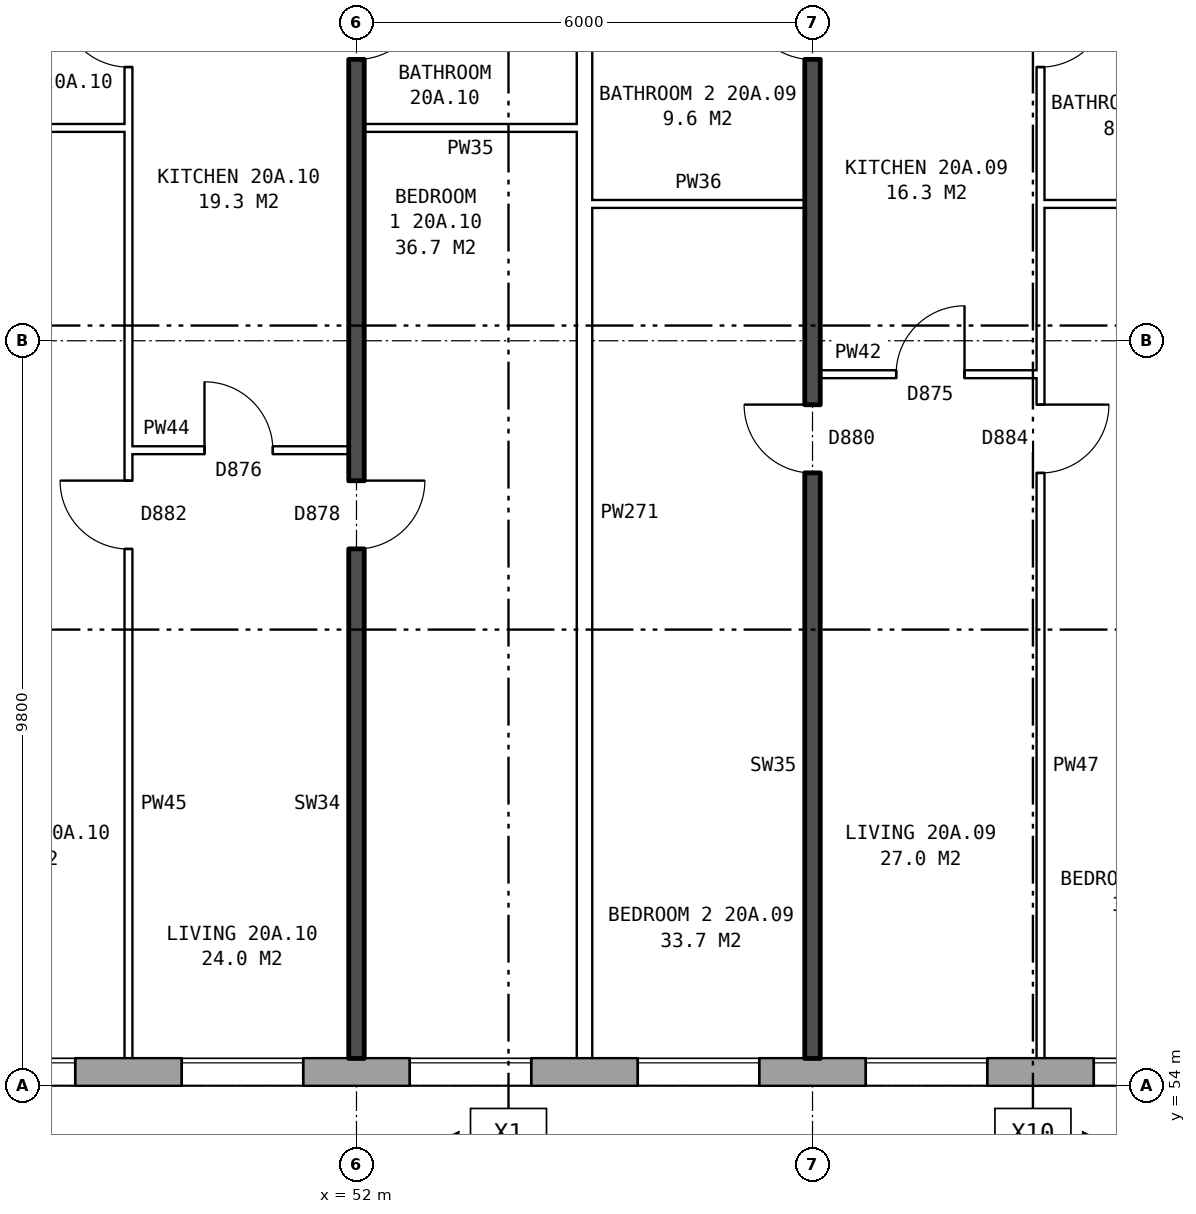
"""IFC4 building model, lengths in metres.
Left out: names, types, materials, properties, quantities, classifications, styles, units other than length and angle.
Written with IfcOpenShell. Run it as: python <this file> out.ifc"""

import sys

from ifc_helpers import new_model, si_unit, direction, frame, frame_2d, origin, place, context, subcontext, project, spatial, rectangle, extrude, element, fill, save


model = new_model("IFC4")
c1 = context("Model", 3, precision=1e-05, world=origin(), true_north=direction((0.0, 1.0)))
c2 = subcontext(c1, "Body", "Model", "MODEL_VIEW")
j1 = project(units=[si_unit("LENGTHUNIT", "METRE"), si_unit("PLANEANGLEUNIT", "RADIAN")], contexts=[c1])
p1 = place(None, origin())
s1 = spatial("IfcSite", under=j1, at=p1, CompositionType="ELEMENT")
p2 = place(p1, origin())
s2 = spatial("IfcBuilding", under=s1, at=p2, CompositionType="ELEMENT")
p3 = place(p2, frame((0.0, 0.0, 74.7)))
s3 = spatial("IfcBuildingStorey", under=s2, at=p3, CompositionType="ELEMENT", Elevation=74.7)
p4 = place(p3, frame((26.325, 54.18, 0.0), z_axis=(0.0, 0.0, 1.0), x_axis=(1.0, 0.0, 0.0)))
e1 = element("IfcWall", 1, at=p4, inside=s3, PredefinedType="STANDARD", context=c2, shape_type="SweptSolid", body=[
    extrude(rectangle(XDim=46.601, YDim=0.36, at=frame_2d((23.3, 0.0))), origin(), (0.0, 0.0, 1.0), 2.85),
])
p5 = place(p4, frame((2.375, 0.0, 0.8)))
e2 = element("IfcOpeningElement", 2, at=p5, cuts=e1, PredefinedType="OPENING", context=c2, shape_type="SweptSolid", body=[
    extrude(rectangle(XDim=1.6, YDim=1.8, at=frame_2d((0.8, 0.9))), frame((0.0, 0.19, 0.0), z_axis=(0.0, -1.0, 0.0), x_axis=(1.0, 0.0, 0.0)), (0.0, 0.0, 1.0), 0.38),
])
p6 = place(p4, frame((4.275, 0.0, 0.8)))
e3 = element("IfcOpeningElement", 3, at=p6, cuts=e1, PredefinedType="OPENING", context=c2, shape_type="SweptSolid", body=[
    extrude(rectangle(XDim=1.6, YDim=1.8, at=frame_2d((0.8, 0.9))), frame((0.0, 0.19, 0.0), z_axis=(0.0, -1.0, 0.0), x_axis=(1.0, 0.0, 0.0)), (0.0, 0.0, 1.0), 0.38),
])
p7 = place(p4, frame((8.275, 0.0, 0.8)))
e4 = element("IfcOpeningElement", 4, at=p7, cuts=e1, PredefinedType="OPENING", context=c2, shape_type="SweptSolid", body=[
    extrude(rectangle(XDim=0.8, YDim=0.9, at=frame_2d((0.4, 0.45))), frame((0.0, 0.19, 0.0), z_axis=(0.0, -1.0, 0.0), x_axis=(1.0, 0.0, 0.0)), (0.0, 0.0, 1.0), 0.38),
])
p8 = place(p4, frame((11.375, 0.0, 0.8)))
e5 = element("IfcOpeningElement", 5, at=p8, cuts=e1, PredefinedType="OPENING", context=c2, shape_type="SweptSolid", body=[
    extrude(rectangle(XDim=1.6, YDim=1.8, at=frame_2d((0.8, 0.9))), frame((0.0, 0.19, 0.0), z_axis=(0.0, -1.0, 0.0), x_axis=(1.0, 0.0, 0.0)), (0.0, 0.0, 1.0), 0.38),
])
p9 = place(p4, frame((14.375, 0.0, 0.8)))
e6 = element("IfcOpeningElement", 6, at=p9, cuts=e1, PredefinedType="OPENING", context=c2, shape_type="SweptSolid", body=[
    extrude(rectangle(XDim=1.6, YDim=1.8, at=frame_2d((0.8, 0.9))), frame((0.0, 0.19, 0.0), z_axis=(0.0, -1.0, 0.0), x_axis=(1.0, 0.0, 0.0)), (0.0, 0.0, 1.0), 0.38),
])
p10 = place(p4, frame((17.375, 0.0, 0.8)))
e7 = element("IfcOpeningElement", 7, at=p10, cuts=e1, PredefinedType="OPENING", context=c2, shape_type="SweptSolid", body=[
    extrude(rectangle(XDim=1.6, YDim=1.8, at=frame_2d((0.8, 0.9))), frame((0.0, 0.19, 0.0), z_axis=(0.0, -1.0, 0.0), x_axis=(1.0, 0.0, 0.0)), (0.0, 0.0, 1.0), 0.38),
])
p11 = place(p4, frame((20.375, 0.0, 0.8)))
e8 = element("IfcOpeningElement", 8, at=p11, cuts=e1, PredefinedType="OPENING", context=c2, shape_type="SweptSolid", body=[
    extrude(rectangle(XDim=1.6, YDim=1.8, at=frame_2d((0.8, 0.9))), frame((0.0, 0.19, 0.0), z_axis=(0.0, -1.0, 0.0), x_axis=(1.0, 0.0, 0.0)), (0.0, 0.0, 1.0), 0.38),
])
p12 = place(p4, frame((23.375, 0.0, 0.8)))
e9 = element("IfcOpeningElement", 9, at=p12, cuts=e1, PredefinedType="OPENING", context=c2, shape_type="SweptSolid", body=[
    extrude(rectangle(XDim=1.6, YDim=1.8, at=frame_2d((0.8, 0.9))), frame((0.0, 0.19, 0.0), z_axis=(0.0, -1.0, 0.0), x_axis=(1.0, 0.0, 0.0)), (0.0, 0.0, 1.0), 0.38),
])
p13 = place(p4, frame((26.375, 0.0, 0.8)))
e10 = element("IfcOpeningElement", 10, at=p13, cuts=e1, PredefinedType="OPENING", context=c2, shape_type="SweptSolid", body=[
    extrude(rectangle(XDim=1.6, YDim=1.8, at=frame_2d((0.8, 0.9))), frame((0.0, 0.19, 0.0), z_axis=(0.0, -1.0, 0.0), x_axis=(1.0, 0.0, 0.0)), (0.0, 0.0, 1.0), 0.38),
])
p14 = place(p4, frame((29.375, 0.0, 0.8)))
e11 = element("IfcOpeningElement", 11, at=p14, cuts=e1, PredefinedType="OPENING", context=c2, shape_type="SweptSolid", body=[
    extrude(rectangle(XDim=1.6, YDim=1.8, at=frame_2d((0.8, 0.9))), frame((0.0, 0.19, 0.0), z_axis=(0.0, -1.0, 0.0), x_axis=(1.0, 0.0, 0.0)), (0.0, 0.0, 1.0), 0.38),
])
p15 = place(p4, frame((32.375, 0.0, 0.8)))
e12 = element("IfcOpeningElement", 12, at=p15, cuts=e1, PredefinedType="OPENING", context=c2, shape_type="SweptSolid", body=[
    extrude(rectangle(XDim=1.6, YDim=1.8, at=frame_2d((0.8, 0.9))), frame((0.0, 0.19, 0.0), z_axis=(0.0, -1.0, 0.0), x_axis=(1.0, 0.0, 0.0)), (0.0, 0.0, 1.0), 0.38),
])
p16 = place(p4, frame((35.375, 0.0, 0.8)))
e13 = element("IfcOpeningElement", 13, at=p16, cuts=e1, PredefinedType="OPENING", context=c2, shape_type="SweptSolid", body=[
    extrude(rectangle(XDim=1.6, YDim=1.8, at=frame_2d((0.8, 0.9))), frame((0.0, 0.19, 0.0), z_axis=(0.0, -1.0, 0.0), x_axis=(1.0, 0.0, 0.0)), (0.0, 0.0, 1.0), 0.38),
])
p17 = place(p4, frame((39.625, 0.0, 1.7)))
e14 = element("IfcOpeningElement", 14, at=p17, cuts=e1, PredefinedType="OPENING", context=c2, shape_type="SweptSolid", body=[
    extrude(rectangle(XDim=1.4, YDim=0.9, at=frame_2d((0.7, 0.45))), frame((0.0, 0.19, 0.0), z_axis=(0.0, -1.0, 0.0), x_axis=(1.0, 0.0, 0.0)), (0.0, 0.0, 1.0), 0.38),
])
p18 = place(p4, frame((41.375, 0.0, 0.8)))
e15 = element("IfcOpeningElement", 15, at=p18, cuts=e1, PredefinedType="OPENING", context=c2, shape_type="SweptSolid", body=[
    extrude(rectangle(XDim=1.6, YDim=1.8, at=frame_2d((0.8, 0.9))), frame((0.0, 0.19, 0.0), z_axis=(0.0, -1.0, 0.0), x_axis=(1.0, 0.0, 0.0)), (0.0, 0.0, 1.0), 0.38),
])
p19 = place(p4, frame((44.375, 0.0, 0.8)))
e16 = element("IfcOpeningElement", 16, at=p19, cuts=e1, PredefinedType="OPENING", context=c2, shape_type="SweptSolid", body=[
    extrude(rectangle(XDim=1.6, YDim=1.8, at=frame_2d((0.8, 0.9))), frame((0.0, 0.19, 0.0), z_axis=(0.0, -1.0, 0.0), x_axis=(1.0, 0.0, 0.0)), (0.0, 0.0, 1.0), 0.38),
])
p20 = place(p4, frame((6.175, 0.0, 1.7)))
e17 = element("IfcOpeningElement", 17, at=p20, cuts=e1, PredefinedType="OPENING", context=c2, shape_type="SweptSolid", body=[
    extrude(rectangle(XDim=0.8, YDim=0.9, at=frame_2d((0.4, 0.45))), frame((0.0, 0.19, 0.0), z_axis=(0.0, -1.0, 0.0), x_axis=(1.0, 0.0, 0.0)), (0.0, 0.0, 1.0), 0.38),
])
p21 = place(p4, frame((9.375, 0.0, 0.8)))
e18 = element("IfcOpeningElement", 18, at=p21, cuts=e1, PredefinedType="OPENING", context=c2, shape_type="SweptSolid", body=[
    extrude(rectangle(XDim=1.0, YDim=1.8, at=frame_2d((0.5, 0.9))), frame((0.0, 0.19, 0.0), z_axis=(0.0, -1.0, 0.0), x_axis=(1.0, 0.0, 0.0)), (0.0, 0.0, 1.0), 0.38),
])
p22 = place(p3, frame((49.0, 62.36, 0.0), z_axis=(0.0, 0.0, 1.0), x_axis=(1.0, 0.0, 0.0)))
e19 = element("IfcWall", 19, at=p22, inside=s3, PredefinedType="PARTITIONING", context=c2, shape_type="SweptSolid", body=[
    extrude(rectangle(XDim=2.9, YDim=0.1, at=frame_2d((1.45, 0.0))), origin(), (0.0, 0.0, 1.0), 2.85),
])
p23 = place(p22, frame((1.0, 0.0, 0.0)))
e20 = element("IfcOpeningElement", 20, at=p23, cuts=e19, PredefinedType="OPENING", context=c2, shape_type="SweptSolid", body=[
    extrude(rectangle(XDim=0.9, YDim=2.1, at=frame_2d((0.45, 1.05))), frame((0.0, 0.06, 0.0), z_axis=(0.0, -1.0, 0.0), x_axis=(1.0, 0.0, 0.0)), (0.0, 0.0, 1.0), 0.12),
])
p24 = place(p3, frame((58.1, 63.36, 0.0), z_axis=(0.0, 0.0, 1.0), x_axis=(1.0, 0.0, 0.0)))
e21 = element("IfcWall", 21, at=p24, inside=s3, PredefinedType="PARTITIONING", context=c2, shape_type="SweptSolid", body=[
    extrude(rectangle(XDim=2.9, YDim=0.1, at=frame_2d((1.45, 0.0))), origin(), (0.0, 0.0, 1.0), 2.85),
])
p25 = place(p24, frame((1.0, 0.0, 0.0)))
e22 = element("IfcOpeningElement", 22, at=p25, cuts=e21, PredefinedType="OPENING", context=c2, shape_type="SweptSolid", body=[
    extrude(rectangle(XDim=0.9, YDim=2.1, at=frame_2d((0.45, 1.05))), frame((0.0, 0.06, 0.0), z_axis=(0.0, -1.0, 0.0), x_axis=(1.0, 0.0, 0.0)), (0.0, 0.0, 1.0), 0.12),
])
p26 = place(p3, frame((55.1, 65.6, 0.0), z_axis=(0.0, 0.0, 1.0), x_axis=(1.0, 0.0, 0.0)))
e23 = element("IfcWall", 23, at=p26, inside=s3, PredefinedType="PARTITIONING", context=c2, shape_type="SweptSolid", body=[
    extrude(rectangle(XDim=2.8, YDim=0.1, at=frame_2d((1.4, 0.0))), origin(), (0.0, 0.0, 1.0), 2.85),
])
p27 = place(p3, frame((61.0, 65.6, 0.0), z_axis=(0.0, 0.0, 1.0), x_axis=(1.0, 0.0, 0.0)))
e24 = element("IfcWall", 24, at=p27, inside=s3, PredefinedType="PARTITIONING", context=c2, shape_type="SweptSolid", body=[
    extrude(rectangle(XDim=2.64, YDim=0.1, at=frame_2d((1.32, 0.0))), origin(), (0.0, 0.0, 1.0), 2.85),
])
p28 = place(p3, frame((46.1, 66.6, 0.0), z_axis=(0.0, 0.0, 1.0), x_axis=(1.0, 0.0, 0.0)))
e25 = element("IfcWall", 25, at=p28, inside=s3, PredefinedType="PARTITIONING", context=c2, shape_type="SweptSolid", body=[
    extrude(rectangle(XDim=2.9, YDim=0.1, at=frame_2d((1.45, 0.0))), origin(), (0.0, 0.0, 1.0), 2.85),
])
p29 = place(p3, frame((52.1, 66.6, 0.0), z_axis=(0.0, 0.0, 1.0), x_axis=(1.0, 0.0, 0.0)))
e26 = element("IfcWall", 26, at=p29, inside=s3, PredefinedType="PARTITIONING", context=c2, shape_type="SweptSolid", body=[
    extrude(rectangle(XDim=2.8, YDim=0.1, at=frame_2d((1.4, 0.0))), origin(), (0.0, 0.0, 1.0), 2.85),
])
p30 = place(p3, frame((49.0, 54.36, 0.0), z_axis=(0.0, 0.0, 1.0), x_axis=(0.0, 1.0, 0.0)))
e27 = element("IfcWall", 27, at=p30, inside=s3, PredefinedType="PARTITIONING", context=c2, shape_type="SweptSolid", body=[
    extrude(rectangle(XDim=14.34, YDim=0.1, at=frame_2d((7.17, 0.0))), origin(), (0.0, 0.0, 1.0), 2.85),
])
p31 = place(p30, frame((6.7, 0.0, 0.0)))
e28 = element("IfcOpeningElement", 28, at=p31, cuts=e27, PredefinedType="OPENING", context=c2, shape_type="SweptSolid", body=[
    extrude(rectangle(XDim=0.9, YDim=2.1, at=frame_2d((0.45, 1.05))), frame((0.0, 0.06, 0.0), z_axis=(0.0, -1.0, 0.0), x_axis=(1.0, 0.0, 0.0)), (0.0, 0.0, 1.0), 0.12),
])
p32 = place(p30, frame((13.04, 0.0, 0.0)))
e29 = element("IfcOpeningElement", 29, at=p32, cuts=e27, PredefinedType="OPENING", context=c2, shape_type="SweptSolid", body=[
    extrude(rectangle(XDim=0.9, YDim=2.1, at=frame_2d((0.45, 1.05))), frame((0.0, 0.06, 0.0), z_axis=(0.0, -1.0, 0.0), x_axis=(1.0, 0.0, 0.0)), (0.0, 0.0, 1.0), 0.12),
])
p33 = place(p3, frame((52.0, 54.36, 0.0), z_axis=(0.0, 0.0, 1.0), x_axis=(0.0, 1.0, 0.0)))
e30 = element("IfcWall", 30, at=p33, inside=s3, PredefinedType="SOLIDWALL", context=c2, shape_type="SweptSolid", body=[
    extrude(rectangle(XDim=14.44, YDim=0.2, at=frame_2d((7.22, 0.0))), origin(), (0.0, 0.0, 1.0), 2.85),
])
p34 = place(p33, frame((6.7, 0.0, 0.0)))
e31 = element("IfcOpeningElement", 31, at=p34, cuts=e30, PredefinedType="OPENING", context=c2, shape_type="SweptSolid", body=[
    extrude(rectangle(XDim=0.9, YDim=2.1, at=frame_2d((0.45, 1.05))), frame((0.0, 0.11, 0.0), z_axis=(0.0, -1.0, 0.0), x_axis=(1.0, 0.0, 0.0)), (0.0, 0.0, 1.0), 0.22),
])
p35 = place(p33, frame((13.14, 0.0, 0.0)))
e32 = element("IfcOpeningElement", 32, at=p35, cuts=e30, PredefinedType="OPENING", context=c2, shape_type="SweptSolid", body=[
    extrude(rectangle(XDim=0.9, YDim=2.1, at=frame_2d((0.45, 1.05))), frame((0.0, 0.11, 0.0), z_axis=(0.0, -1.0, 0.0), x_axis=(1.0, 0.0, 0.0)), (0.0, 0.0, 1.0), 0.22),
])
p36 = place(p3, frame((55.0, 54.36, 0.0), z_axis=(0.0, 0.0, 1.0), x_axis=(0.0, 1.0, 0.0)))
e33 = element("IfcWall", 33, at=p36, inside=s3, PredefinedType="PARTITIONING", context=c2, shape_type="SweptSolid", body=[
    extrude(rectangle(XDim=14.34, YDim=0.2, at=frame_2d((7.17, 0.0))), origin(), (0.0, 0.0, 1.0), 2.85),
])
p37 = place(p3, frame((58.0, 54.36, 0.0), z_axis=(0.0, 0.0, 1.0), x_axis=(0.0, 1.0, 0.0)))
e34 = element("IfcWall", 34, at=p37, inside=s3, PredefinedType="SOLIDWALL", context=c2, shape_type="SweptSolid", body=[
    extrude(rectangle(XDim=14.44, YDim=0.2, at=frame_2d((7.22, 0.0))), origin(), (0.0, 0.0, 1.0), 2.85),
])
p38 = place(p37, frame((7.7, 0.0, 0.0)))
e35 = element("IfcOpeningElement", 35, at=p38, cuts=e34, PredefinedType="OPENING", context=c2, shape_type="SweptSolid", body=[
    extrude(rectangle(XDim=0.9, YDim=2.1, at=frame_2d((0.45, 1.05))), frame((0.0, 0.11, 0.0), z_axis=(0.0, -1.0, 0.0), x_axis=(1.0, 0.0, 0.0)), (0.0, 0.0, 1.0), 0.22),
])
p39 = place(p37, frame((13.14, 0.0, 0.0)))
e36 = element("IfcOpeningElement", 36, at=p39, cuts=e34, PredefinedType="OPENING", context=c2, shape_type="SweptSolid", body=[
    extrude(rectangle(XDim=0.9, YDim=2.1, at=frame_2d((0.45, 1.05))), frame((0.0, 0.11, 0.0), z_axis=(0.0, -1.0, 0.0), x_axis=(1.0, 0.0, 0.0)), (0.0, 0.0, 1.0), 0.22),
])
p40 = place(p3, frame((61.0, 54.36, 0.0), z_axis=(0.0, 0.0, 1.0), x_axis=(0.0, 1.0, 0.0)))
e37 = element("IfcWall", 37, at=p40, inside=s3, PredefinedType="PARTITIONING", context=c2, shape_type="SweptSolid", body=[
    extrude(rectangle(XDim=14.34, YDim=0.1, at=frame_2d((7.17, 0.0))), origin(), (0.0, 0.0, 1.0), 2.85),
])
p41 = place(p40, frame((7.7, 0.0, 0.0)))
e38 = element("IfcOpeningElement", 38, at=p41, cuts=e37, PredefinedType="OPENING", context=c2, shape_type="SweptSolid", body=[
    extrude(rectangle(XDim=0.9, YDim=2.1, at=frame_2d((0.45, 1.05))), frame((0.0, 0.06, 0.0), z_axis=(0.0, -1.0, 0.0), x_axis=(1.0, 0.0, 0.0)), (0.0, 0.0, 1.0), 0.12),
])
p42 = place(p40, frame((13.04, 0.0, 0.0)))
e39 = element("IfcOpeningElement", 39, at=p42, cuts=e37, PredefinedType="OPENING", context=c2, shape_type="SweptSolid", body=[
    extrude(rectangle(XDim=0.9, YDim=2.1, at=frame_2d((0.45, 1.05))), frame((0.0, 0.06, 0.0), z_axis=(0.0, -1.0, 0.0), x_axis=(1.0, 0.0, 0.0)), (0.0, 0.0, 1.0), 0.12),
])
p43 = place(p11, origin())
e40 = element("IfcWindow", 40, at=p43, inside=s3, PartitioningType="SINGLE_PANEL", PredefinedType="WINDOW", context=c2, shape_type="SweptSolid", body=[
    extrude(rectangle(XDim=1.6, YDim=1.8, at=frame_2d((0.8, 0.9))), frame((0.0, 0.15, 0.0), z_axis=(0.0, -1.0, 0.0), x_axis=(1.0, 0.0, 0.0)), (0.0, 0.0, 1.0), 0.06),
])
fill(e8, e40)
p44 = place(p12, origin())
e41 = element("IfcWindow", 41, at=p44, inside=s3, PartitioningType="SINGLE_PANEL", PredefinedType="WINDOW", context=c2, shape_type="SweptSolid", body=[
    extrude(rectangle(XDim=1.6, YDim=1.8, at=frame_2d((0.8, 0.9))), frame((0.0, 0.15, 0.0), z_axis=(0.0, -1.0, 0.0), x_axis=(1.0, 0.0, 0.0)), (0.0, 0.0, 1.0), 0.06),
])
fill(e9, e41)
p45 = place(p13, origin())
e42 = element("IfcWindow", 42, at=p45, inside=s3, PartitioningType="SINGLE_PANEL", PredefinedType="WINDOW", context=c2, shape_type="SweptSolid", body=[
    extrude(rectangle(XDim=1.6, YDim=1.8, at=frame_2d((0.8, 0.9))), frame((0.0, 0.15, 0.0), z_axis=(0.0, -1.0, 0.0), x_axis=(1.0, 0.0, 0.0)), (0.0, 0.0, 1.0), 0.06),
])
fill(e10, e42)
p46 = place(p14, origin())
e43 = element("IfcWindow", 43, at=p46, inside=s3, PartitioningType="SINGLE_PANEL", PredefinedType="WINDOW", context=c2, shape_type="SweptSolid", body=[
    extrude(rectangle(XDim=1.6, YDim=1.8, at=frame_2d((0.8, 0.9))), frame((0.0, 0.15, 0.0), z_axis=(0.0, -1.0, 0.0), x_axis=(1.0, 0.0, 0.0)), (0.0, 0.0, 1.0), 0.06),
])
fill(e11, e43)
p47 = place(p15, origin())
e44 = element("IfcWindow", 44, at=p47, inside=s3, PartitioningType="SINGLE_PANEL", PredefinedType="WINDOW", context=c2, shape_type="SweptSolid", body=[
    extrude(rectangle(XDim=1.6, YDim=1.8, at=frame_2d((0.8, 0.9))), frame((0.0, 0.15, 0.0), z_axis=(0.0, -1.0, 0.0), x_axis=(1.0, 0.0, 0.0)), (0.0, 0.0, 1.0), 0.06),
])
fill(e12, e44)
p48 = place(p16, origin())
e45 = element("IfcWindow", 45, at=p48, inside=s3, PartitioningType="SINGLE_PANEL", PredefinedType="WINDOW", context=c2, shape_type="SweptSolid", body=[
    extrude(rectangle(XDim=1.6, YDim=1.8, at=frame_2d((0.8, 0.9))), frame((0.0, 0.15, 0.0), z_axis=(0.0, -1.0, 0.0), x_axis=(1.0, 0.0, 0.0)), (0.0, 0.0, 1.0), 0.06),
])
fill(e13, e45)
p49 = place(p41, frame((0.9, 0.0, 0.0), z_axis=(0.0, 0.0, 1.0), x_axis=(-1.0, 0.0, 0.0)))
e46 = element("IfcDoor", 46, at=p49, inside=s3, OperationType="SINGLE_SWING_LEFT", PredefinedType="DOOR", context=c2, shape_type="SweptSolid", body=[
    extrude(rectangle(XDim=0.9, YDim=2.1, at=frame_2d((0.45, 1.05))), frame((0.0, 0.025, 0.0), z_axis=(0.0, -1.0, 0.0), x_axis=(1.0, 0.0, 0.0)), (0.0, 0.0, 1.0), 0.05),
])
fill(e38, e46)
p50 = place(p38, origin())
e47 = element("IfcDoor", 47, at=p50, inside=s3, OperationType="SINGLE_SWING_RIGHT", PredefinedType="DOOR", context=c2, shape_type="SweptSolid", body=[
    extrude(rectangle(XDim=0.9, YDim=2.1, at=frame_2d((0.45, 1.05))), frame((0.0, 0.025, 0.0), z_axis=(0.0, -1.0, 0.0), x_axis=(1.0, 0.0, 0.0)), (0.0, 0.0, 1.0), 0.05),
])
fill(e35, e47)
p51 = place(p25, origin())
e48 = element("IfcDoor", 48, at=p51, inside=s3, OperationType="SINGLE_SWING_RIGHT", PredefinedType="DOOR", context=c2, shape_type="SweptSolid", body=[
    extrude(rectangle(XDim=0.9, YDim=2.1, at=frame_2d((0.45, 1.05))), frame((0.0, 0.025, 0.0), z_axis=(0.0, -1.0, 0.0), x_axis=(1.0, 0.0, 0.0)), (0.0, 0.0, 1.0), 0.05),
])
fill(e22, e48)
p52 = place(p42, frame((0.9, 0.0, 0.0), z_axis=(0.0, 0.0, 1.0), x_axis=(-1.0, 0.0, 0.0)))
e49 = element("IfcDoor", 49, at=p52, inside=s3, OperationType="SINGLE_SWING_LEFT", PredefinedType="DOOR", context=c2, shape_type="SweptSolid", body=[
    extrude(rectangle(XDim=0.9, YDim=2.1, at=frame_2d((0.45, 1.05))), frame((0.0, 0.025, 0.0), z_axis=(0.0, -1.0, 0.0), x_axis=(1.0, 0.0, 0.0)), (0.0, 0.0, 1.0), 0.05),
])
fill(e39, e49)
p53 = place(p39, origin())
e50 = element("IfcDoor", 50, at=p53, inside=s3, OperationType="SINGLE_SWING_RIGHT", PredefinedType="DOOR", context=c2, shape_type="SweptSolid", body=[
    extrude(rectangle(XDim=0.9, YDim=2.1, at=frame_2d((0.45, 1.05))), frame((0.0, 0.025, 0.0), z_axis=(0.0, -1.0, 0.0), x_axis=(1.0, 0.0, 0.0)), (0.0, 0.0, 1.0), 0.05),
])
fill(e36, e50)
p54 = place(p34, frame((0.9, 0.0, 0.0), z_axis=(0.0, 0.0, 1.0), x_axis=(-1.0, 0.0, 0.0)))
e51 = element("IfcDoor", 51, at=p54, inside=s3, OperationType="SINGLE_SWING_LEFT", PredefinedType="DOOR", context=c2, shape_type="SweptSolid", body=[
    extrude(rectangle(XDim=0.9, YDim=2.1, at=frame_2d((0.45, 1.05))), frame((0.0, 0.025, 0.0), z_axis=(0.0, -1.0, 0.0), x_axis=(1.0, 0.0, 0.0)), (0.0, 0.0, 1.0), 0.05),
])
fill(e31, e51)
p55 = place(p31, origin())
e52 = element("IfcDoor", 52, at=p55, inside=s3, OperationType="SINGLE_SWING_RIGHT", PredefinedType="DOOR", context=c2, shape_type="SweptSolid", body=[
    extrude(rectangle(XDim=0.9, YDim=2.1, at=frame_2d((0.45, 1.05))), frame((0.0, 0.025, 0.0), z_axis=(0.0, -1.0, 0.0), x_axis=(1.0, 0.0, 0.0)), (0.0, 0.0, 1.0), 0.05),
])
fill(e28, e52)
p56 = place(p23, origin())
e53 = element("IfcDoor", 53, at=p56, inside=s3, OperationType="SINGLE_SWING_LEFT", PredefinedType="DOOR", context=c2, shape_type="SweptSolid", body=[
    extrude(rectangle(XDim=0.9, YDim=2.1, at=frame_2d((0.45, 1.05))), frame((0.0, 0.025, 0.0), z_axis=(0.0, -1.0, 0.0), x_axis=(1.0, 0.0, 0.0)), (0.0, 0.0, 1.0), 0.05),
])
fill(e20, e53)
p57 = place(p35, frame((0.9, 0.0, 0.0), z_axis=(0.0, 0.0, 1.0), x_axis=(-1.0, 0.0, 0.0)))
e54 = element("IfcDoor", 54, at=p57, inside=s3, OperationType="SINGLE_SWING_LEFT", PredefinedType="DOOR", context=c2, shape_type="SweptSolid", body=[
    extrude(rectangle(XDim=0.9, YDim=2.1, at=frame_2d((0.45, 1.05))), frame((0.0, 0.025, 0.0), z_axis=(0.0, -1.0, 0.0), x_axis=(1.0, 0.0, 0.0)), (0.0, 0.0, 1.0), 0.05),
])
fill(e32, e54)
p58 = place(p32, origin())
e55 = element("IfcDoor", 55, at=p58, inside=s3, OperationType="SINGLE_SWING_RIGHT", PredefinedType="DOOR", context=c2, shape_type="SweptSolid", body=[
    extrude(rectangle(XDim=0.9, YDim=2.1, at=frame_2d((0.45, 1.05))), frame((0.0, 0.025, 0.0), z_axis=(0.0, -1.0, 0.0), x_axis=(1.0, 0.0, 0.0)), (0.0, 0.0, 1.0), 0.05),
])
fill(e29, e55)
save(model, sys.argv[1])
